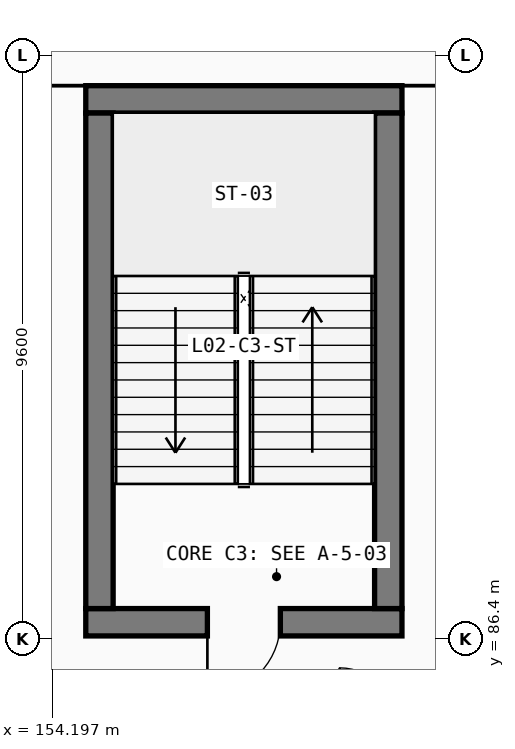
"""IFC4 building model, lengths in metres.
Left out: names, types, materials, properties, quantities, classifications, styles, units other than length and angle.
Written with IfcOpenShell. Run it as: python <this file> out.ifc"""

import sys

from ifc_helpers import new_model, si_unit, direction, frame, frame_2d, origin, place, context, subcontext, project, spatial, rectangle, extrude, element, fill, save


model = new_model("IFC4")
c1 = context("Model", 3, precision=1e-05, world=origin(), true_north=direction((0.0, 1.0)))
c2 = subcontext(c1, "Body", "Model", "MODEL_VIEW")
j1 = project(units=[si_unit("LENGTHUNIT", "METRE"), si_unit("PLANEANGLEUNIT", "RADIAN")], contexts=[c1])
p1 = place(None, origin())
s1 = spatial("IfcSite", under=j1, at=p1, CompositionType="ELEMENT")
p2 = place(p1, origin())
s2 = spatial("IfcBuilding", under=s1, at=p2, CompositionType="ELEMENT")
p3 = place(p2, frame((0.0, 0.0, 9.6)))
s3 = spatial("IfcBuildingStorey", under=s2, at=p3, CompositionType="ELEMENT", Elevation=9.6)
p4 = place(p3, frame((154.75, 86.675, 0.0), z_axis=(0.0, 0.0, 1.0), x_axis=(1.0, 0.0, 0.0)))
e1 = element("IfcWall", 1, at=p4, inside=s3, PredefinedType="SHEAR", context=c2, shape_type="SweptSolid", body=[
    extrude(rectangle(XDim=5.2, YDim=0.45, at=frame_2d((2.6, 0.0))), origin(), (0.0, 0.0, 1.0), 4.22),
])
p5 = place(p4, frame((3.2, 0.0, 0.0), z_axis=(0.0, 0.0, 1.0), x_axis=(-1.0, 0.0, 0.0)))
e2 = element("IfcOpeningElement", 2, at=p5, cuts=e1, PredefinedType="OPENING", context=c2, shape_type="SweptSolid", body=[
    extrude(rectangle(XDim=1.2, YDim=2.2, at=frame_2d((0.6, 1.1))), frame((0.0, 0.235, 0.0), z_axis=(0.0, -1.0, 0.0), x_axis=(1.0, 0.0, 0.0)), (0.0, 0.0, 1.0), 0.47),
])
p6 = place(p3, frame((159.95, 95.275, 0.0), z_axis=(0.0, 0.0, 1.0), x_axis=(-1.0, 0.0, 0.0)))
e3 = element("IfcWall", 3, at=p6, inside=s3, PredefinedType="SHEAR", context=c2, shape_type="SweptSolid", body=[
    extrude(rectangle(XDim=5.2, YDim=0.45, at=frame_2d((2.6, 0.0))), origin(), (0.0, 0.0, 1.0), 4.22),
])
for number, where, z_axis, x_axis in (
    (4, (154.975, 95.05, 0.0), (0.0, 0.0, 1.0), (0.0, -1.0, 0.0)),
    (5, (159.725, 86.9, 0.0), (0.0, 0.0, 1.0), (0.0, 1.0, 0.0)),
):
    element("IfcWall", number, at=place(p3, frame(where, z_axis=z_axis, x_axis=x_axis)), inside=s3, PredefinedType="SHEAR", context=c2, shape_type="SweptSolid", body=[
        extrude(rectangle(XDim=8.15, YDim=0.45, at=frame_2d((4.075, 0.0))), origin(), (0.0, 0.0, 1.0), 4.22),
    ])
p7 = place(p5, origin())
e6 = element("IfcDoor", 6, at=p7, inside=s3, OperationType="SINGLE_SWING_RIGHT", PredefinedType="DOOR", context=c2, shape_type="SweptSolid", body=[
    extrude(rectangle(XDim=1.2, YDim=2.2, at=frame_2d((0.6, 1.1))), frame((0.0, 0.025, 0.0), z_axis=(0.0, -1.0, 0.0), x_axis=(1.0, 0.0, 0.0)), (0.0, 0.0, 1.0), 0.05),
])
fill(e2, e6)
save(model, sys.argv[1])
